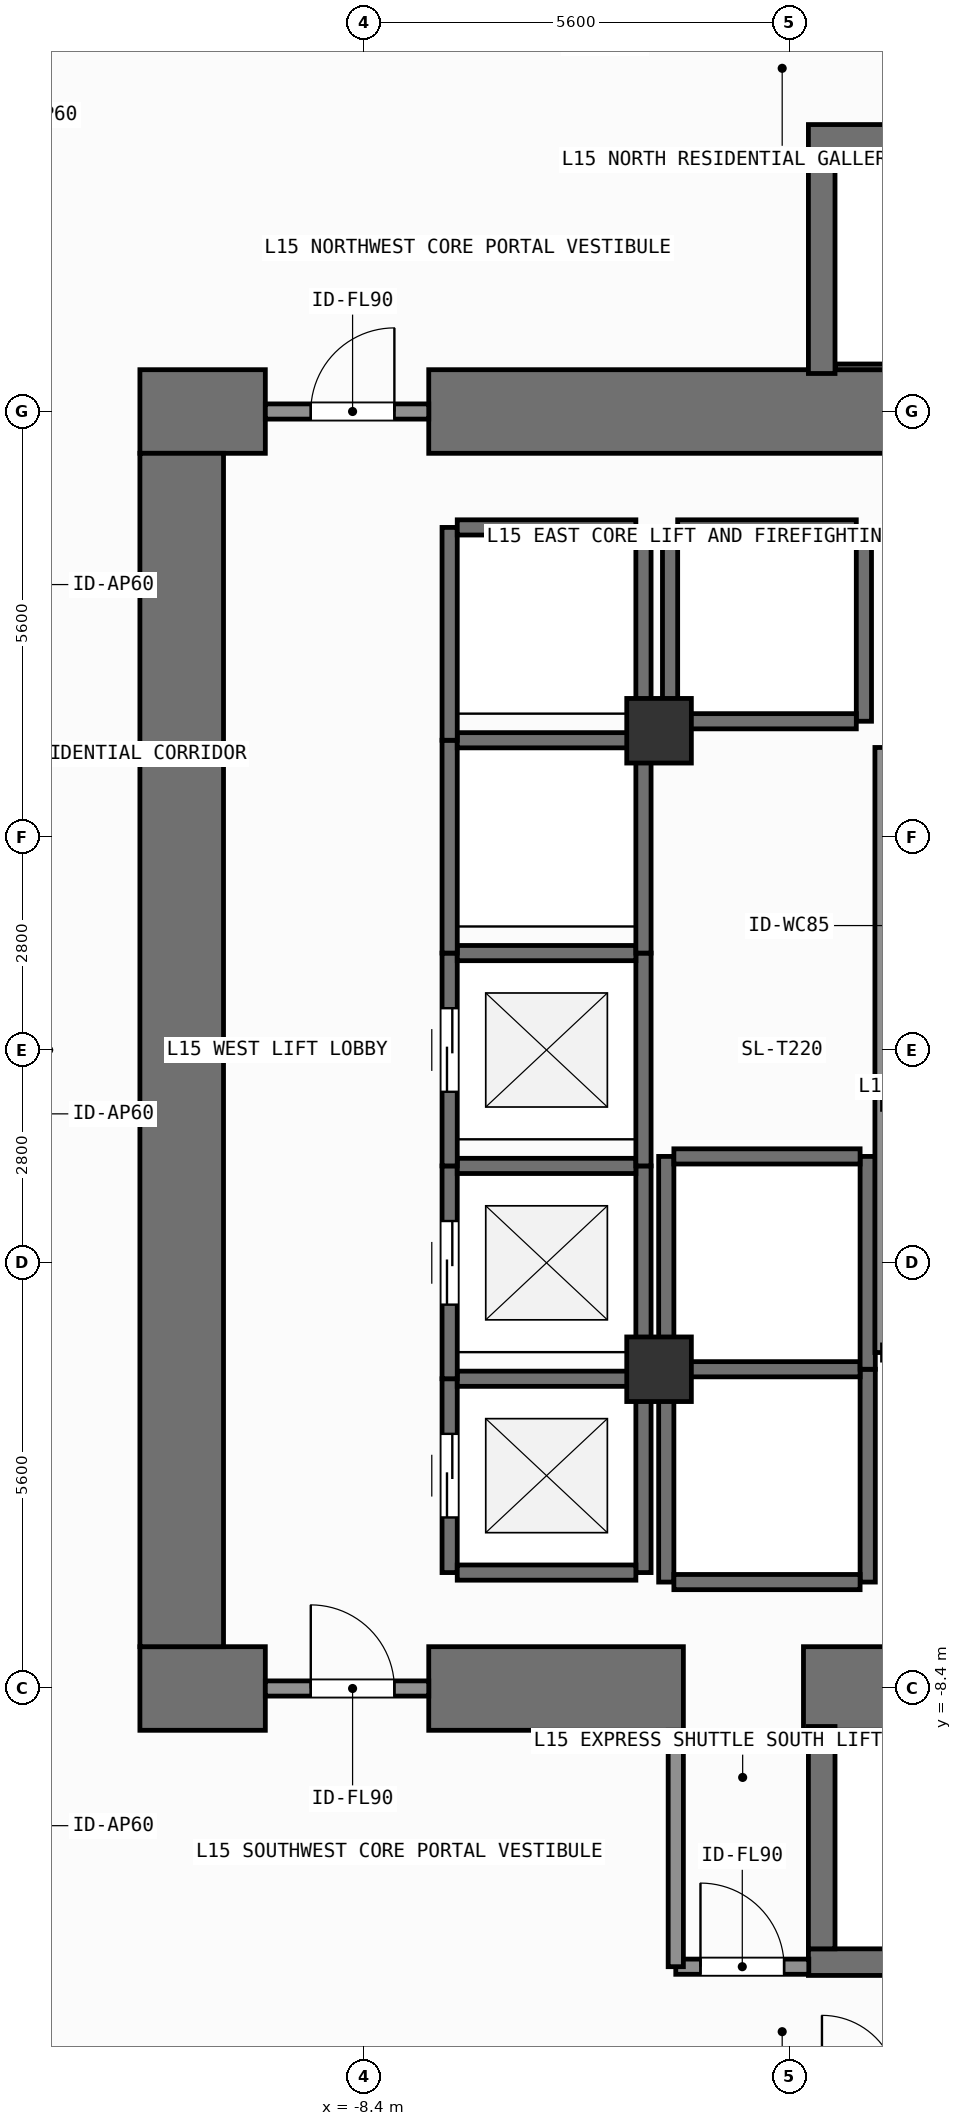
"""IFC4 building model, lengths in metres.
Left out: names, types, materials, properties, quantities, classifications, styles, units other than length and angle.
Written with IfcOpenShell. Run it as: python <this file> out.ifc"""

import sys

from ifc_helpers import new_model, si_unit, direction, frame, frame_2d, origin, origin_2d, place, context, subcontext, project, spatial, rectangle, extrude, element, fill, save


model = new_model("IFC4")
c1 = context("Model", 3, precision=1e-05, world=origin(), true_north=direction((0.0, 1.0)))
c2 = subcontext(c1, "Body", "Model", "MODEL_VIEW")
j1 = project(units=[si_unit("LENGTHUNIT", "METRE"), si_unit("PLANEANGLEUNIT", "RADIAN")], contexts=[c1])
p1 = place(None, origin())
s1 = spatial("IfcSite", under=j1, at=p1, CompositionType="ELEMENT")
p2 = place(p1, origin())
s2 = spatial("IfcBuilding", under=s1, at=p2, CompositionType="ELEMENT")
p3 = place(p2, frame((0.0, 0.0, 57.9)))
s3 = spatial("IfcBuildingStorey", under=s2, at=p3, CompositionType="ELEMENT", Elevation=57.9)
p4 = place(p3, frame((-11.35, -8.4, 0.0), z_axis=(0.0, 0.0, 1.0), x_axis=(1.0, 0.0, 0.0)))
e1 = element("IfcWall", 1, at=p4, inside=s3, PredefinedType="SHEAR", context=c2, shape_type="SweptSolid", body=[
    extrude(rectangle(XDim=1.65, YDim=1.1, at=frame_2d((0.825, 0.0))), origin(), (0.0, 0.0, 1.0), 3.9),
])
p5 = place(p3, frame((-7.55, -8.4, 0.0), z_axis=(0.0, 0.0, 1.0), x_axis=(1.0, 0.0, 0.0)))
e2 = element("IfcWall", 2, at=p5, inside=s3, PredefinedType="SHEAR", context=c2, shape_type="SweptSolid", body=[
    extrude(rectangle(XDim=3.35, YDim=1.1, at=frame_2d((1.675, 0.0))), origin(), (0.0, 0.0, 1.0), 3.9),
])
p6 = place(p3, frame((-2.62, -8.4, 0.0), z_axis=(0.0, 0.0, 1.0), x_axis=(1.0, 0.0, 0.0)))
e3 = element("IfcWall", 3, at=p6, inside=s3, PredefinedType="SHEAR", context=c2, shape_type="SweptSolid", body=[
    extrude(rectangle(XDim=7.27, YDim=1.1, at=frame_2d((3.635, 0.0))), origin(), (0.0, 0.0, 1.0), 3.9),
])
p7 = place(p3, frame((-11.35, 8.4, 0.0), z_axis=(0.0, 0.0, 1.0), x_axis=(1.0, 0.0, 0.0)))
e4 = element("IfcWall", 4, at=p7, inside=s3, PredefinedType="SHEAR", context=c2, shape_type="SweptSolid", body=[
    extrude(rectangle(XDim=1.65, YDim=1.1, at=frame_2d((0.825, 0.0))), origin(), (0.0, 0.0, 1.0), 3.9),
])
p8 = place(p3, frame((-7.55, 8.4, 0.0), z_axis=(0.0, 0.0, 1.0), x_axis=(1.0, 0.0, 0.0)))
e5 = element("IfcWall", 5, at=p8, inside=s3, PredefinedType="SHEAR", context=c2, shape_type="SweptSolid", body=[
    extrude(rectangle(XDim=16.5, YDim=1.1, at=frame_2d((8.25, 0.0))), origin(), (0.0, 0.0, 1.0), 3.9),
])
p9 = place(p3, frame((-10.8, -7.85, 0.0), z_axis=(0.0, 0.0, 1.0), x_axis=(0.0, 1.0, 0.0)))
e6 = element("IfcWall", 6, at=p9, inside=s3, PredefinedType="SHEAR", context=c2, shape_type="SweptSolid", body=[
    extrude(rectangle(XDim=15.7, YDim=1.1, at=frame_2d((7.85, 0.0))), origin(), (0.0, 0.0, 1.0), 3.9),
])
p10 = place(p3, frame((-2.555, -12.0, 0.0), z_axis=(0.0, 0.0, 1.0), x_axis=(1.0, 0.0, 0.0)))
e7 = element("IfcWall", 7, at=p10, inside=s3, PredefinedType="SHEAR", context=c2, shape_type="SweptSolid", body=[
    extrude(rectangle(XDim=7.31, YDim=0.35, at=frame_2d((3.655, 0.0))), origin(), (0.0, 0.0, 1.0), 3.9),
])
p11 = place(p3, frame((-2.2, -8.988, 0.0), z_axis=(0.0, 0.0, 1.0), x_axis=(1.0, 0.0, 0.0)))
e8 = element("IfcWall", 8, at=p11, inside=s3, PredefinedType="SHEAR", context=c2, shape_type="SweptSolid", body=[
    extrude(rectangle(XDim=6.6, YDim=0.075, at=frame_2d((3.3, 0.0))), origin(), (0.0, 0.0, 1.0), 3.9),
])
p12 = place(p3, frame((-2.38, -11.825, 0.0), z_axis=(0.0, 0.0, 1.0), x_axis=(0.0, 1.0, 0.0)))
e9 = element("IfcWall", 9, at=p12, inside=s3, PredefinedType="SHEAR", context=c2, shape_type="SweptSolid", body=[
    extrude(rectangle(XDim=2.925, YDim=0.35, at=frame_2d((1.462, 0.0))), origin(), (0.0, 0.0, 1.0), 3.9),
])
p13 = place(p3, frame((-2.555, 12.0, 0.0), z_axis=(0.0, 0.0, 1.0), x_axis=(1.0, 0.0, 0.0)))
e10 = element("IfcWall", 10, at=p13, inside=s3, PredefinedType="SHEAR", context=c2, shape_type="SweptSolid", body=[
    extrude(rectangle(XDim=7.31, YDim=0.35, at=frame_2d((3.655, 0.0))), origin(), (0.0, 0.0, 1.0), 3.9),
])
p14 = place(p3, frame((-2.2, 8.988, 0.0), z_axis=(0.0, 0.0, 1.0), x_axis=(1.0, 0.0, 0.0)))
e11 = element("IfcWall", 11, at=p14, inside=s3, PredefinedType="SHEAR", context=c2, shape_type="SweptSolid", body=[
    extrude(rectangle(XDim=6.6, YDim=0.075, at=frame_2d((3.3, 0.0))), origin(), (0.0, 0.0, 1.0), 3.9),
])
p15 = place(p3, frame((-2.38, 8.9, 0.0), z_axis=(0.0, 0.0, 1.0), x_axis=(0.0, 1.0, 0.0)))
e12 = element("IfcWall", 12, at=p15, inside=s3, PredefinedType="SHEAR", context=c2, shape_type="SweptSolid", body=[
    extrude(rectangle(XDim=2.925, YDim=0.35, at=frame_2d((1.462, 0.0))), origin(), (0.0, 0.0, 1.0), 3.9),
])
for number, where, z_axis, x_axis in (
    (13, (-4.52, -4.2, 0.0), (0.0, 0.0, 1.0), (1.0, 0.0, 0.0)),
    (14, (-4.52, 4.2, 0.0), (0.0, 0.0, 1.0), (1.0, 0.0, 0.0)),
):
    element("IfcColumn", number, at=place(p3, frame(where, z_axis=z_axis, x_axis=x_axis)), inside=s3, PredefinedType="COLUMN", context=c2, shape_type="SweptSolid", body=[
        extrude(rectangle(XDim=0.85, YDim=0.85, at=origin_2d()), origin(), (0.0, 0.0, 1.0), 3.9),
    ])
p16 = place(p3, frame((-7.275, -6.875, 0.0), z_axis=(0.0, 0.0, 1.0), x_axis=(0.0, 1.0, 0.0)))
e15 = element("IfcWall", 15, at=p16, inside=s3, PredefinedType="SHEAR", context=c2, shape_type="SweptSolid", body=[
    extrude(rectangle(XDim=2.55, YDim=0.2, at=frame_2d((1.275, 0.0))), origin(), (0.0, 0.0, 1.0), 3.68),
])
p17 = place(p16, frame((0.725, 0.0, 0.0)))
e16 = element("IfcOpeningElement", 16, at=p17, cuts=e15, PredefinedType="OPENING", context=c2, shape_type="SweptSolid", body=[
    extrude(rectangle(XDim=1.1, YDim=2.2, at=frame_2d((0.55, 1.1))), frame((0.0, 0.11, 0.0), z_axis=(0.0, -1.0, 0.0), x_axis=(1.0, 0.0, 0.0)), (0.0, 0.0, 1.0), 0.22),
])
p18 = place(p3, frame((-4.725, -6.875, 0.0), z_axis=(0.0, 0.0, 1.0), x_axis=(0.0, 1.0, 0.0)))
e17 = element("IfcWall", 17, at=p18, inside=s3, PredefinedType="SHEAR", context=c2, shape_type="SweptSolid", body=[
    extrude(rectangle(XDim=2.55, YDim=0.2, at=frame_2d((1.275, 0.0))), origin(), (0.0, 0.0, 1.0), 3.68),
])
for number, where, z_axis, x_axis in (
    (18, (-7.175, -6.875, 0.0), (0.0, 0.0, 1.0), (1.0, 0.0, 0.0)),
    (19, (-7.175, -4.325, 0.0), (0.0, 0.0, 1.0), (1.0, 0.0, 0.0)),
):
    element("IfcWall", number, at=place(p3, frame(where, z_axis=z_axis, x_axis=x_axis)), inside=s3, PredefinedType="SHEAR", context=c2, shape_type="SweptSolid", body=[
        extrude(rectangle(XDim=2.35, YDim=0.2, at=frame_2d((1.175, 0.0))), origin(), (0.0, 0.0, 1.0), 3.68),
    ])
p19 = place(p3, frame((-7.275, -4.325, 0.0), z_axis=(0.0, 0.0, 1.0), x_axis=(0.0, 1.0, 0.0)))
e20 = element("IfcWall", 20, at=p19, inside=s3, PredefinedType="SHEAR", context=c2, shape_type="SweptSolid", body=[
    extrude(rectangle(XDim=2.8, YDim=0.2, at=frame_2d((1.4, 0.0))), origin(), (0.0, 0.0, 1.0), 3.68),
])
p20 = place(p19, frame((0.975, 0.0, 0.0)))
e21 = element("IfcOpeningElement", 21, at=p20, cuts=e20, PredefinedType="OPENING", context=c2, shape_type="SweptSolid", body=[
    extrude(rectangle(XDim=1.1, YDim=2.2, at=frame_2d((0.55, 1.1))), frame((0.0, 0.11, 0.0), z_axis=(0.0, -1.0, 0.0), x_axis=(1.0, 0.0, 0.0)), (0.0, 0.0, 1.0), 0.22),
])
p21 = place(p3, frame((-4.725, -4.325, 0.0), z_axis=(0.0, 0.0, 1.0), x_axis=(0.0, 1.0, 0.0)))
e22 = element("IfcWall", 22, at=p21, inside=s3, PredefinedType="SHEAR", context=c2, shape_type="SweptSolid", body=[
    extrude(rectangle(XDim=2.8, YDim=0.2, at=frame_2d((1.4, 0.0))), origin(), (0.0, 0.0, 1.0), 3.68),
])
p22 = place(p3, frame((-7.175, -1.525, 0.0), z_axis=(0.0, 0.0, 1.0), x_axis=(1.0, 0.0, 0.0)))
e23 = element("IfcWall", 23, at=p22, inside=s3, PredefinedType="SHEAR", context=c2, shape_type="SweptSolid", body=[
    extrude(rectangle(XDim=2.35, YDim=0.2, at=frame_2d((1.175, 0.0))), origin(), (0.0, 0.0, 1.0), 3.68),
])
p23 = place(p3, frame((-7.275, -1.525, 0.0), z_axis=(0.0, 0.0, 1.0), x_axis=(0.0, 1.0, 0.0)))
e24 = element("IfcWall", 24, at=p23, inside=s3, PredefinedType="SHEAR", context=c2, shape_type="SweptSolid", body=[
    extrude(rectangle(XDim=2.8, YDim=0.2, at=frame_2d((1.4, 0.0))), origin(), (0.0, 0.0, 1.0), 3.68),
])
p24 = place(p23, frame((0.975, 0.0, 0.0)))
e25 = element("IfcOpeningElement", 25, at=p24, cuts=e24, PredefinedType="OPENING", context=c2, shape_type="SweptSolid", body=[
    extrude(rectangle(XDim=1.1, YDim=2.2, at=frame_2d((0.55, 1.1))), frame((0.0, 0.11, 0.0), z_axis=(0.0, -1.0, 0.0), x_axis=(1.0, 0.0, 0.0)), (0.0, 0.0, 1.0), 0.22),
])
p25 = place(p3, frame((-4.725, -1.525, 0.0), z_axis=(0.0, 0.0, 1.0), x_axis=(0.0, 1.0, 0.0)))
e26 = element("IfcWall", 26, at=p25, inside=s3, PredefinedType="SHEAR", context=c2, shape_type="SweptSolid", body=[
    extrude(rectangle(XDim=2.8, YDim=0.2, at=frame_2d((1.4, 0.0))), origin(), (0.0, 0.0, 1.0), 3.68),
])
p26 = place(p3, frame((-7.175, 1.275, 0.0), z_axis=(0.0, 0.0, 1.0), x_axis=(1.0, 0.0, 0.0)))
e27 = element("IfcWall", 27, at=p26, inside=s3, PredefinedType="SHEAR", context=c2, shape_type="SweptSolid", body=[
    extrude(rectangle(XDim=2.35, YDim=0.2, at=frame_2d((1.175, 0.0))), origin(), (0.0, 0.0, 1.0), 3.68),
])
for number, where, z_axis, x_axis in (
    (28, (-7.275, 1.275, 0.0), (0.0, 0.0, 1.0), (0.0, 1.0, 0.0)),
    (29, (-4.725, 1.275, 0.0), (0.0, 0.0, 1.0), (0.0, 1.0, 0.0)),
):
    element("IfcWall", number, at=place(p3, frame(where, z_axis=z_axis, x_axis=x_axis)), inside=s3, PredefinedType="SHEAR", context=c2, shape_type="SweptSolid", body=[
        extrude(rectangle(XDim=2.8, YDim=0.2, at=frame_2d((1.4, 0.0))), origin(), (0.0, 0.0, 1.0), 3.68),
    ])
p27 = place(p3, frame((-7.175, 4.075, 0.0), z_axis=(0.0, 0.0, 1.0), x_axis=(1.0, 0.0, 0.0)))
e30 = element("IfcWall", 30, at=p27, inside=s3, PredefinedType="SHEAR", context=c2, shape_type="SweptSolid", body=[
    extrude(rectangle(XDim=2.35, YDim=0.2, at=frame_2d((1.175, 0.0))), origin(), (0.0, 0.0, 1.0), 3.68),
])
for number, where, z_axis, x_axis in (
    (31, (-7.275, 4.075, 0.0), (0.0, 0.0, 1.0), (0.0, 1.0, 0.0)),
    (32, (-4.725, 4.075, 0.0), (0.0, 0.0, 1.0), (0.0, 1.0, 0.0)),
):
    element("IfcWall", number, at=place(p3, frame(where, z_axis=z_axis, x_axis=x_axis)), inside=s3, PredefinedType="SHEAR", context=c2, shape_type="SweptSolid", body=[
        extrude(rectangle(XDim=2.8, YDim=0.2, at=frame_2d((1.4, 0.0))), origin(), (0.0, 0.0, 1.0), 3.68),
    ])
p28 = place(p3, frame((-7.175, 6.875, 0.0), z_axis=(0.0, 0.0, 1.0), x_axis=(1.0, 0.0, 0.0)))
e33 = element("IfcWall", 33, at=p28, inside=s3, PredefinedType="SHEAR", context=c2, shape_type="SweptSolid", body=[
    extrude(rectangle(XDim=2.35, YDim=0.2, at=frame_2d((1.175, 0.0))), origin(), (0.0, 0.0, 1.0), 3.68),
])
for number, where, z_axis, x_axis in (
    (34, (-4.375, 4.325, 0.0), (0.0, 0.0, 1.0), (0.0, 1.0, 0.0)),
    (35, (-1.825, 4.325, 0.0), (0.0, 0.0, 1.0), (0.0, 1.0, 0.0)),
):
    element("IfcWall", number, at=place(p3, frame(where, z_axis=z_axis, x_axis=x_axis)), inside=s3, PredefinedType="SHEAR", context=c2, shape_type="SweptSolid", body=[
        extrude(rectangle(XDim=2.55, YDim=0.2, at=frame_2d((1.275, 0.0))), origin(), (0.0, 0.0, 1.0), 3.68),
    ])
for number, where, z_axis, x_axis in (
    (36, (-4.275, 4.325, 0.0), (0.0, 0.0, 1.0), (1.0, 0.0, 0.0)),
    (37, (-4.275, 6.875, 0.0), (0.0, 0.0, 1.0), (1.0, 0.0, 0.0)),
):
    element("IfcWall", number, at=place(p3, frame(where, z_axis=z_axis, x_axis=x_axis)), inside=s3, PredefinedType="SHEAR", context=c2, shape_type="SweptSolid", body=[
        extrude(rectangle(XDim=2.35, YDim=0.2, at=frame_2d((1.175, 0.0))), origin(), (0.0, 0.0, 1.0), 3.68),
    ])
for number, where, z_axis, x_axis in (
    (38, (-4.425, -7.0, 0.0), (0.0, 0.0, 1.0), (0.0, 1.0, 0.0)),
    (39, (-1.775, -7.0, 0.0), (0.0, 0.0, 1.0), (0.0, 1.0, 0.0)),
):
    element("IfcWall", number, at=place(p3, frame(where, z_axis=z_axis, x_axis=x_axis)), inside=s3, PredefinedType="SHEAR", context=c2, shape_type="SweptSolid", body=[
        extrude(rectangle(XDim=2.8, YDim=0.2, at=frame_2d((1.4, 0.0))), origin(), (0.0, 0.0, 1.0), 3.68),
    ])
for number, where, z_axis, x_axis in (
    (40, (-4.325, -7.0, 0.0), (0.0, 0.0, 1.0), (1.0, 0.0, 0.0)),
    (41, (-4.325, -4.2, 0.0), (0.0, 0.0, 1.0), (1.0, 0.0, 0.0)),
):
    element("IfcWall", number, at=place(p3, frame(where, z_axis=z_axis, x_axis=x_axis)), inside=s3, PredefinedType="SHEAR", context=c2, shape_type="SweptSolid", body=[
        extrude(rectangle(XDim=2.45, YDim=0.2, at=frame_2d((1.225, 0.0))), origin(), (0.0, 0.0, 1.0), 3.68),
    ])
for number, where, z_axis, x_axis in (
    (42, (-4.425, -4.2, 0.0), (0.0, 0.0, 1.0), (0.0, 1.0, 0.0)),
    (43, (-1.775, -4.2, 0.0), (0.0, 0.0, 1.0), (0.0, 1.0, 0.0)),
):
    element("IfcWall", number, at=place(p3, frame(where, z_axis=z_axis, x_axis=x_axis)), inside=s3, PredefinedType="SHEAR", context=c2, shape_type="SweptSolid", body=[
        extrude(rectangle(XDim=2.8, YDim=0.2, at=frame_2d((1.4, 0.0))), origin(), (0.0, 0.0, 1.0), 3.68),
    ])
p29 = place(p3, frame((-4.325, -1.4, 0.0), z_axis=(0.0, 0.0, 1.0), x_axis=(1.0, 0.0, 0.0)))
e44 = element("IfcWall", 44, at=p29, inside=s3, PredefinedType="SHEAR", context=c2, shape_type="SweptSolid", body=[
    extrude(rectangle(XDim=2.45, YDim=0.2, at=frame_2d((1.225, 0.0))), origin(), (0.0, 0.0, 1.0), 3.68),
])
p30 = place(p3, frame((-9.7, -8.4, 0.0), z_axis=(0.0, 0.0, 1.0), x_axis=(1.0, 0.0, 0.0)))
e45 = element("IfcWall", 45, at=p30, inside=s3, PredefinedType="SOLIDWALL", context=c2, shape_type="SweptSolid", body=[
    extrude(rectangle(XDim=2.15, YDim=0.2, at=frame_2d((1.075, 0.0))), origin(), (0.0, 0.0, 1.0), 2.72),
])
p31 = place(p30, frame((0.598, 0.0, 0.0)))
e46 = element("IfcOpeningElement", 46, at=p31, cuts=e45, PredefinedType="OPENING", context=c2, shape_type="SweptSolid", body=[
    extrude(rectangle(XDim=1.1, YDim=2.15, at=frame_2d((0.55, 1.075))), frame((0.0, 0.11, 0.0), z_axis=(0.0, -1.0, 0.0), x_axis=(1.0, 0.0, 0.0)), (0.0, 0.0, 1.0), 0.22),
])
p32 = place(p3, frame((-9.7, 8.4, 0.0), z_axis=(0.0, 0.0, 1.0), x_axis=(1.0, 0.0, 0.0)))
e47 = element("IfcWall", 47, at=p32, inside=s3, PredefinedType="SOLIDWALL", context=c2, shape_type="SweptSolid", body=[
    extrude(rectangle(XDim=2.15, YDim=0.2, at=frame_2d((1.075, 0.0))), origin(), (0.0, 0.0, 1.0), 2.72),
])
p33 = place(p32, frame((0.598, 0.0, 0.0)))
e48 = element("IfcOpeningElement", 48, at=p33, cuts=e47, PredefinedType="OPENING", context=c2, shape_type="SweptSolid", body=[
    extrude(rectangle(XDim=1.1, YDim=2.15, at=frame_2d((0.55, 1.075))), frame((0.0, 0.11, 0.0), z_axis=(0.0, -1.0, 0.0), x_axis=(1.0, 0.0, 0.0)), (0.0, 0.0, 1.0), 0.22),
])
p34 = place(p3, frame((-4.3, -12.06, 0.0), z_axis=(0.0, 0.0, 1.0), x_axis=(1.0, 0.0, 0.0)))
e49 = element("IfcWall", 49, at=p34, inside=s3, PredefinedType="SOLIDWALL", context=c2, shape_type="SweptSolid", body=[
    extrude(rectangle(XDim=1.75, YDim=0.2, at=frame_2d((0.875, 0.0))), origin(), (0.0, 0.0, 1.0), 3.68),
])
p35 = place(p34, frame((0.325, 0.0, 0.0)))
e50 = element("IfcOpeningElement", 50, at=p35, cuts=e49, PredefinedType="OPENING", context=c2, shape_type="SweptSolid", body=[
    extrude(rectangle(XDim=1.1, YDim=2.15, at=frame_2d((0.55, 1.075))), frame((0.0, 0.11, 0.0), z_axis=(0.0, -1.0, 0.0), x_axis=(1.0, 0.0, 0.0)), (0.0, 0.0, 1.0), 0.22),
])
p36 = place(p3, frame((-4.3, -12.06, 0.0), z_axis=(0.0, 0.0, 1.0), x_axis=(0.0, 1.0, 0.0)))
e51 = element("IfcWall", 51, at=p36, inside=s3, PredefinedType="SOLIDWALL", context=c2, shape_type="SweptSolid", body=[
    extrude(rectangle(XDim=3.11, YDim=0.2, at=frame_2d((1.555, 0.0))), origin(), (0.0, 0.0, 1.0), 3.68),
])
p37 = place(p3, frame((-1.58, -3.98, 0.0), z_axis=(0.0, 0.0, 1.0), x_axis=(0.0, 1.0, 0.0)))
e52 = element("IfcWall", 52, at=p37, inside=s3, PredefinedType="SOLIDWALL", context=c2, shape_type="SweptSolid", body=[
    extrude(rectangle(XDim=7.96, YDim=0.2, at=frame_2d((3.98, 0.0))), origin(), (0.0, 0.0, 1.0), 3.68),
])
p38 = place(p17, origin())
e53 = element("IfcDoor", 53, at=p38, inside=s3, OperationType="SLIDING_TO_LEFT", PredefinedType="DOOR", context=c2, shape_type="SweptSolid", body=[
    extrude(rectangle(XDim=1.1, YDim=2.2, at=frame_2d((0.55, 1.1))), frame((0.0, 0.025, 0.0), z_axis=(0.0, -1.0, 0.0), x_axis=(1.0, 0.0, 0.0)), (0.0, 0.0, 1.0), 0.05),
])
fill(e16, e53)
p39 = place(p20, origin())
e54 = element("IfcDoor", 54, at=p39, inside=s3, OperationType="SLIDING_TO_LEFT", PredefinedType="DOOR", context=c2, shape_type="SweptSolid", body=[
    extrude(rectangle(XDim=1.1, YDim=2.2, at=frame_2d((0.55, 1.1))), frame((0.0, 0.025, 0.0), z_axis=(0.0, -1.0, 0.0), x_axis=(1.0, 0.0, 0.0)), (0.0, 0.0, 1.0), 0.05),
])
fill(e21, e54)
p40 = place(p24, origin())
e55 = element("IfcDoor", 55, at=p40, inside=s3, OperationType="SLIDING_TO_LEFT", PredefinedType="DOOR", context=c2, shape_type="SweptSolid", body=[
    extrude(rectangle(XDim=1.1, YDim=2.2, at=frame_2d((0.55, 1.1))), frame((0.0, 0.025, 0.0), z_axis=(0.0, -1.0, 0.0), x_axis=(1.0, 0.0, 0.0)), (0.0, 0.0, 1.0), 0.05),
])
fill(e25, e55)
p41 = place(p31, origin())
e56 = element("IfcDoor", 56, at=p41, inside=s3, OperationType="SINGLE_SWING_LEFT", PredefinedType="DOOR", context=c2, shape_type="SweptSolid", body=[
    extrude(rectangle(XDim=1.1, YDim=2.15, at=frame_2d((0.55, 1.075))), frame((0.0, 0.025, 0.0), z_axis=(0.0, -1.0, 0.0), x_axis=(1.0, 0.0, 0.0)), (0.0, 0.0, 1.0), 0.05),
])
fill(e46, e56)
p42 = place(p33, origin())
e57 = element("IfcDoor", 57, at=p42, inside=s3, OperationType="SINGLE_SWING_RIGHT", PredefinedType="DOOR", context=c2, shape_type="SweptSolid", body=[
    extrude(rectangle(XDim=1.1, YDim=2.15, at=frame_2d((0.55, 1.075))), frame((0.0, 0.025, 0.0), z_axis=(0.0, -1.0, 0.0), x_axis=(1.0, 0.0, 0.0)), (0.0, 0.0, 1.0), 0.05),
])
fill(e48, e57)
p43 = place(p35, origin())
e58 = element("IfcDoor", 58, at=p43, inside=s3, OperationType="SINGLE_SWING_LEFT", PredefinedType="DOOR", context=c2, shape_type="SweptSolid", body=[
    extrude(rectangle(XDim=1.1, YDim=2.15, at=frame_2d((0.55, 1.075))), frame((0.0, 0.025, 0.0), z_axis=(0.0, -1.0, 0.0), x_axis=(1.0, 0.0, 0.0)), (0.0, 0.0, 1.0), 0.05),
])
fill(e50, e58)
save(model, sys.argv[1])
